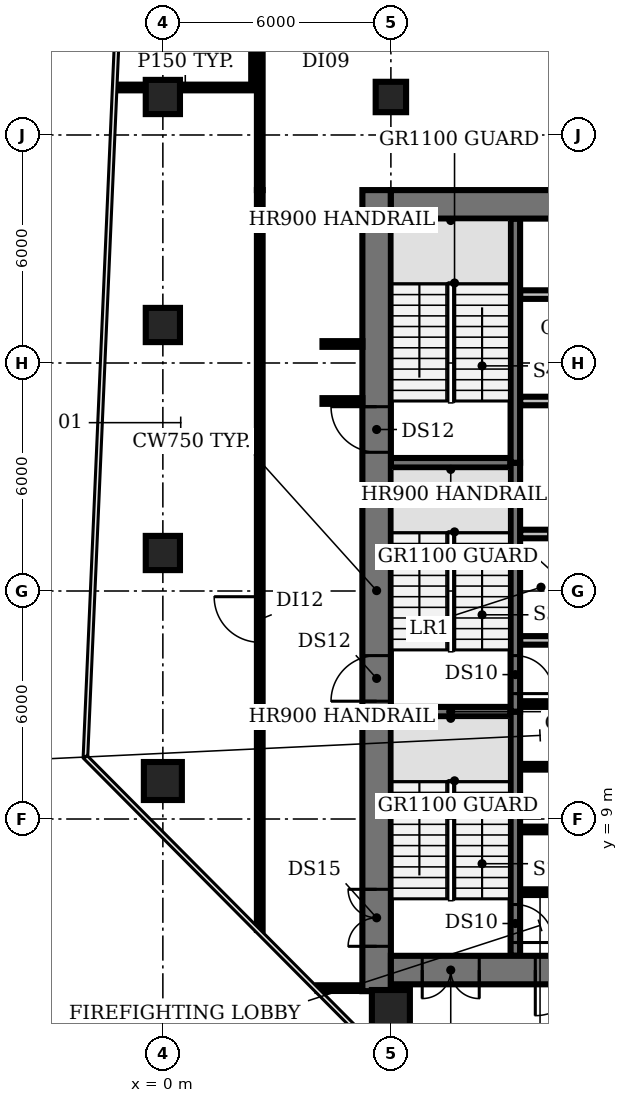
"""IFC4 building model, lengths in metres.
Left out: names, types, materials, properties, quantities, classifications, styles, units other than length and angle.
Written with IfcOpenShell. Run it as: python <this file> out.ifc"""

import sys

from ifc_helpers import new_model, si_unit, direction, frame, frame_2d, origin, origin_2d, place, context, subcontext, project, spatial, rectangle, circle, extrude, element, fill, save


model = new_model("IFC4")
c1 = context("Model", 3, precision=1e-05, world=origin(), true_north=direction((0.0, 1.0)))
c2 = subcontext(c1, "Body", "Model", "MODEL_VIEW")
j1 = project(units=[si_unit("LENGTHUNIT", "METRE"), si_unit("PLANEANGLEUNIT", "RADIAN")], contexts=[c1])
p1 = place(None, origin())
s1 = spatial("IfcSite", under=j1, at=p1, CompositionType="ELEMENT")
p2 = place(p1, origin())
s2 = spatial("IfcBuilding", under=s1, at=p2, CompositionType="ELEMENT")
p3 = place(p2, frame((0.0, 0.0, 121.4)))
s3 = spatial("IfcBuildingStorey", under=s2, at=p3, CompositionType="ELEMENT", Elevation=121.4)
p4 = place(p3, frame((0.0, 10.0, 0.0), z_axis=(0.0, 0.0, 1.0), x_axis=(1.0, 0.0, 0.0)))
e1 = element("IfcColumn", 1, at=p4, inside=s3, PredefinedType="COLUMN", context=c2, shape_type="SweptSolid", body=[
    extrude(circle(Radius=0.5, at=origin_2d()), origin(), (0.0, 0.0, 1.0), 3.85),
])
for number, where, z_axis, x_axis in (
    (2, (0.0, 16.0, 0.0), (0.0, 0.0, 1.0), (1.0, 0.0, 0.0)),
    (3, (0.0, 22.0, 0.0), (0.0, 0.0, 1.0), (1.0, 0.0, 0.0)),
    (4, (0.0, 28.0, 0.0), (0.0, 0.0, 1.0), (1.0, 0.0, 0.0)),
):
    element("IfcColumn", number, at=place(p3, frame(where, z_axis=z_axis, x_axis=x_axis)), inside=s3, PredefinedType="COLUMN", context=c2, shape_type="SweptSolid", body=[
        extrude(rectangle(XDim=0.9, YDim=0.9, at=origin_2d()), origin(), (0.0, 0.0, 1.0), 3.85),
    ])
p5 = place(p3, frame((6.0, 4.0, 0.0), z_axis=(0.0, 0.0, 1.0), x_axis=(1.0, 0.0, 0.0)))
e5 = element("IfcColumn", 5, at=p5, inside=s3, PredefinedType="COLUMN", context=c2, shape_type="SweptSolid", body=[
    extrude(circle(Radius=0.5, at=origin_2d()), origin(), (0.0, 0.0, 1.0), 3.85),
])
p6 = place(p3, frame((6.0, 28.0, 0.0), z_axis=(0.0, 0.0, 1.0), x_axis=(1.0, 0.0, 0.0)))
e6 = element("IfcColumn", 6, at=p6, inside=s3, PredefinedType="COLUMN", context=c2, shape_type="SweptSolid", body=[
    extrude(rectangle(XDim=0.8, YDim=0.8, at=origin_2d()), origin(), (0.0, 0.0, 1.0), 3.85),
])
for number, where, z_axis, x_axis in (
    (7, (9.4, 7.075, 0.0), (0.0, 0.0, 1.0), (1.0, 0.0, 0.0)),
    (8, (9.4, 8.725, 0.0), (0.0, 0.0, 1.0), (1.0, 0.0, 0.0)),
    (9, (9.4, 10.375, 0.0), (0.0, 0.0, 1.0), (1.0, 0.0, 0.0)),
):
    element("IfcWall", number, at=place(p3, frame(where, z_axis=z_axis, x_axis=x_axis)), inside=s3, PredefinedType="SHEAR", context=c2, shape_type="SweptSolid", body=[
        extrude(rectangle(XDim=1.05, YDim=0.15, at=frame_2d((0.525, 0.0))), origin(), (0.0, 0.0, 1.0), 3.85),
    ])
p7 = place(p3, frame((6.0, 11.825, 0.0), z_axis=(0.0, 0.0, 1.0), x_axis=(1.0, 0.0, 0.0)))
e10 = element("IfcWall", 10, at=p7, inside=s3, PredefinedType="SHEAR", context=c2, shape_type="SweptSolid", body=[
    extrude(rectangle(XDim=3.15, YDim=0.25, at=frame_2d((1.575, 0.0))), origin(), (0.0, 0.0, 1.0), 3.85),
])
p8 = place(p3, frame((9.4, 12.025, 0.0), z_axis=(0.0, 0.0, 1.0), x_axis=(1.0, 0.0, 0.0)))
e11 = element("IfcWall", 11, at=p8, inside=s3, PredefinedType="SHEAR", context=c2, shape_type="SweptSolid", body=[
    extrude(rectangle(XDim=1.05, YDim=0.15, at=frame_2d((0.525, 0.0))), origin(), (0.0, 0.0, 1.0), 3.85),
])
p9 = place(p3, frame((9.4, 13.7, 0.0), z_axis=(0.0, 0.0, 1.0), x_axis=(1.0, 0.0, 0.0)))
e12 = element("IfcWall", 12, at=p9, inside=s3, PredefinedType="PARTITIONING", context=c2, shape_type="SweptSolid", body=[
    extrude(rectangle(XDim=4.0, YDim=0.225, at=frame_2d((2.0, 0.0))), origin(), (0.0, 0.0, 1.0), 3.85),
])
p10 = place(p3, frame((9.4, 16.5, 0.0), z_axis=(0.0, 0.0, 1.0), x_axis=(1.0, 0.0, 0.0)))
e13 = element("IfcWall", 13, at=p10, inside=s3, PredefinedType="PARTITIONING", context=c2, shape_type="SweptSolid", body=[
    extrude(rectangle(XDim=14.6, YDim=0.225, at=frame_2d((7.3, 0.0))), origin(), (0.0, 0.0, 1.0), 3.85),
])
p11 = place(p10, frame((0.75, 0.0, 0.0)))
e14 = element("IfcOpeningElement", 14, at=p11, cuts=e13, PredefinedType="OPENING", context=c2, shape_type="SweptSolid", body=[
    extrude(rectangle(XDim=1.1, YDim=2.1, at=frame_2d((0.55, 1.05))), frame((0.0, 0.123, 0.0), z_axis=(0.0, -1.0, 0.0), x_axis=(1.0, 0.0, 0.0)), (0.0, 0.0, 1.0), 0.245),
])
p12 = place(p10, frame((3.55, 0.0, 0.0)))
e15 = element("IfcOpeningElement", 15, at=p12, cuts=e13, PredefinedType="OPENING", context=c2, shape_type="SweptSolid", body=[
    extrude(rectangle(XDim=1.1, YDim=2.1, at=frame_2d((0.55, 1.05))), frame((0.0, 0.123, 0.0), z_axis=(0.0, -1.0, 0.0), x_axis=(1.0, 0.0, 0.0)), (0.0, 0.0, 1.0), 0.245),
])
p13 = place(p10, frame((6.35, 0.0, 0.0)))
e16 = element("IfcOpeningElement", 16, at=p13, cuts=e13, PredefinedType="OPENING", context=c2, shape_type="SweptSolid", body=[
    extrude(rectangle(XDim=1.1, YDim=2.1, at=frame_2d((0.55, 1.05))), frame((0.0, 0.123, 0.0), z_axis=(0.0, -1.0, 0.0), x_axis=(1.0, 0.0, 0.0)), (0.0, 0.0, 1.0), 0.245),
])
p14 = place(p10, frame((9.15, 0.0, 0.0)))
e17 = element("IfcOpeningElement", 17, at=p14, cuts=e13, PredefinedType="OPENING", context=c2, shape_type="SweptSolid", body=[
    extrude(rectangle(XDim=1.1, YDim=2.1, at=frame_2d((0.55, 1.05))), frame((0.0, 0.123, 0.0), z_axis=(0.0, -1.0, 0.0), x_axis=(1.0, 0.0, 0.0)), (0.0, 0.0, 1.0), 0.245),
])
p15 = place(p10, frame((12.4, 0.0, 0.0)))
e18 = element("IfcOpeningElement", 18, at=p15, cuts=e13, PredefinedType="OPENING", context=c2, shape_type="SweptSolid", body=[
    extrude(rectangle(XDim=1.0, YDim=2.1, at=frame_2d((0.5, 1.05))), frame((0.0, 0.123, 0.0), z_axis=(0.0, -1.0, 0.0), x_axis=(1.0, 0.0, 0.0)), (0.0, 0.0, 1.0), 0.245),
])
p16 = place(p3, frame((6.0, 18.375, 0.0), z_axis=(0.0, 0.0, 1.0), x_axis=(1.0, 0.0, 0.0)))
e19 = element("IfcWall", 19, at=p16, inside=s3, PredefinedType="SHEAR", context=c2, shape_type="SweptSolid", body=[
    extrude(rectangle(XDim=3.15, YDim=0.25, at=frame_2d((1.575, 0.0))), origin(), (0.0, 0.0, 1.0), 3.85),
])
p17 = place(p3, frame((24.0, 20.0, 0.0), z_axis=(0.0, 0.0, 1.0), x_axis=(-1.0, 0.0, 0.0)))
e20 = element("IfcWall", 20, at=p17, inside=s3, PredefinedType="PARTITIONING", context=c2, shape_type="SweptSolid", body=[
    extrude(rectangle(XDim=14.6, YDim=0.225, at=frame_2d((7.3, 0.0))), origin(), (0.0, 0.0, 1.0), 3.85),
])
p18 = place(p17, frame((12.2, 0.0, 0.0)))
e21 = element("IfcOpeningElement", 21, at=p18, cuts=e20, PredefinedType="OPENING", context=c2, shape_type="SweptSolid", body=[
    extrude(rectangle(XDim=1.0, YDim=2.1, at=frame_2d((0.5, 1.05))), frame((0.0, 0.123, 0.0), z_axis=(0.0, -1.0, 0.0), x_axis=(1.0, 0.0, 0.0)), (0.0, 0.0, 1.0), 0.245),
])
p19 = place(p17, frame((9.025, 0.0, 0.0)))
e22 = element("IfcOpeningElement", 22, at=p19, cuts=e20, PredefinedType="OPENING", context=c2, shape_type="SweptSolid", body=[
    extrude(rectangle(XDim=0.9, YDim=2.1, at=frame_2d((0.45, 1.05))), frame((0.0, 0.123, 0.0), z_axis=(0.0, -1.0, 0.0), x_axis=(1.0, 0.0, 0.0)), (0.0, 0.0, 1.0), 0.245),
])
p20 = place(p17, frame((5.375, 0.0, 0.0)))
e23 = element("IfcOpeningElement", 23, at=p20, cuts=e20, PredefinedType="OPENING", context=c2, shape_type="SweptSolid", body=[
    extrude(rectangle(XDim=1.0, YDim=2.1, at=frame_2d((0.5, 1.05))), frame((0.0, 0.123, 0.0), z_axis=(0.0, -1.0, 0.0), x_axis=(1.0, 0.0, 0.0)), (0.0, 0.0, 1.0), 0.245),
])
p21 = place(p17, frame((1.2, 0.0, 0.0)))
e24 = element("IfcOpeningElement", 24, at=p21, cuts=e20, PredefinedType="OPENING", context=c2, shape_type="SweptSolid", body=[
    extrude(rectangle(XDim=1.0, YDim=2.1, at=frame_2d((0.5, 1.05))), frame((0.0, 0.123, 0.0), z_axis=(0.0, -1.0, 0.0), x_axis=(1.0, 0.0, 0.0)), (0.0, 0.0, 1.0), 0.245),
])
p22 = place(p3, frame((9.4, 22.8, 0.0), z_axis=(0.0, 0.0, 1.0), x_axis=(1.0, 0.0, 0.0)))
e25 = element("IfcWall", 25, at=p22, inside=s3, PredefinedType="PARTITIONING", context=c2, shape_type="SweptSolid", body=[
    extrude(rectangle(XDim=14.6, YDim=0.225, at=frame_2d((7.3, 0.0))), origin(), (0.0, 0.0, 1.0), 3.85),
])
p23 = place(p3, frame((9.275, 11.825, 0.0), z_axis=(0.0, 0.0, 1.0), x_axis=(0.0, -1.0, 0.0)))
e26 = element("IfcWall", 26, at=p23, inside=s3, PredefinedType="SHEAR", context=c2, shape_type="SweptSolid", body=[
    extrude(rectangle(XDim=6.425, YDim=0.25, at=frame_2d((3.212, 0.0))), origin(), (0.0, 0.0, 1.0), 3.85),
])
p24 = place(p23, frame((5.075, 0.0, 0.0)))
e27 = element("IfcOpeningElement", 27, at=p24, cuts=e26, PredefinedType="OPENING", context=c2, shape_type="SweptSolid", body=[
    extrude(rectangle(XDim=1.0, YDim=2.1, at=frame_2d((0.5, 1.05))), frame((0.0, 0.135, 0.0), z_axis=(0.0, -1.0, 0.0), x_axis=(1.0, 0.0, 0.0)), (0.0, 0.0, 1.0), 0.27),
])
p25 = place(p3, frame((9.275, 18.375, 0.0), z_axis=(0.0, 0.0, 1.0), x_axis=(0.0, -1.0, 0.0)))
e28 = element("IfcWall", 28, at=p25, inside=s3, PredefinedType="SHEAR", context=c2, shape_type="SweptSolid", body=[
    extrude(rectangle(XDim=6.55, YDim=0.25, at=frame_2d((3.275, 0.0))), origin(), (0.0, 0.0, 1.0), 3.85),
])
p26 = place(p25, frame((5.075, 0.0, 0.0)))
e29 = element("IfcOpeningElement", 29, at=p26, cuts=e28, PredefinedType="OPENING", context=c2, shape_type="SweptSolid", body=[
    extrude(rectangle(XDim=1.0, YDim=2.1, at=frame_2d((0.5, 1.05))), frame((0.0, 0.135, 0.0), z_axis=(0.0, -1.0, 0.0), x_axis=(1.0, 0.0, 0.0)), (0.0, 0.0, 1.0), 0.27),
])
p27 = place(p3, frame((9.275, 18.375, 0.0), z_axis=(0.0, 0.0, 1.0), x_axis=(0.0, 1.0, 0.0)))
e30 = element("IfcWall", 30, at=p27, inside=s3, PredefinedType="SHEAR", context=c2, shape_type="SweptSolid", body=[
    extrude(rectangle(XDim=6.425, YDim=0.25, at=frame_2d((3.212, 0.0))), origin(), (0.0, 0.0, 1.0), 3.85),
])
p28 = place(p3, frame((5.625, 4.47, 0.0), z_axis=(0.0, 0.0, 1.0), x_axis=(0.0, 1.0, 0.0)))
e31 = element("IfcWall", 31, at=p28, inside=s3, PredefinedType="SHEAR", context=c2, shape_type="SweptSolid", body=[
    extrude(rectangle(XDim=21.08, YDim=0.75, at=frame_2d((10.54, 0.0))), origin(), (0.0, 0.0, 1.0), 3.85),
])
p29 = place(p28, frame((1.18, 0.0, 0.0)))
e32 = element("IfcOpeningElement", 32, at=p29, cuts=e31, PredefinedType="OPENING", context=c2, shape_type="SweptSolid", body=[
    extrude(rectangle(XDim=1.5, YDim=2.1, at=frame_2d((0.75, 1.05))), frame((0.0, 0.385, 0.0), z_axis=(0.0, -1.0, 0.0), x_axis=(1.0, 0.0, 0.0)), (0.0, 0.0, 1.0), 0.77),
])
p30 = place(p28, frame((7.63, 0.0, 0.0)))
e33 = element("IfcOpeningElement", 33, at=p30, cuts=e31, PredefinedType="OPENING", context=c2, shape_type="SweptSolid", body=[
    extrude(rectangle(XDim=1.2, YDim=2.1, at=frame_2d((0.6, 1.05))), frame((0.0, 0.385, 0.0), z_axis=(0.0, -1.0, 0.0), x_axis=(1.0, 0.0, 0.0)), (0.0, 0.0, 1.0), 0.77),
])
p31 = place(p28, frame((14.18, 0.0, 0.0)))
e34 = element("IfcOpeningElement", 34, at=p31, cuts=e31, PredefinedType="OPENING", context=c2, shape_type="SweptSolid", body=[
    extrude(rectangle(XDim=1.2, YDim=2.1, at=frame_2d((0.6, 1.05))), frame((0.0, 0.385, 0.0), z_axis=(0.0, -1.0, 0.0), x_axis=(1.0, 0.0, 0.0)), (0.0, 0.0, 1.0), 0.77),
])
p32 = place(p3, frame((24.0, 5.025, 0.0), z_axis=(0.0, 0.0, 1.0), x_axis=(-1.0, 0.0, 0.0)))
e35 = element("IfcWall", 35, at=p32, inside=s3, PredefinedType="SHEAR", context=c2, shape_type="SweptSolid", body=[
    extrude(rectangle(XDim=18.0, YDim=0.75, at=frame_2d((9.0, 0.0))), origin(), (0.0, 0.0, 1.0), 3.85),
])
p33 = place(p32, frame((0.825, 0.0, 0.0)))
e36 = element("IfcOpeningElement", 36, at=p33, cuts=e35, PredefinedType="OPENING", context=c2, shape_type="SweptSolid", body=[
    extrude(rectangle(XDim=1.5, YDim=2.1, at=frame_2d((0.75, 1.05))), frame((0.0, 0.385, 0.0), z_axis=(0.0, -1.0, 0.0), x_axis=(1.0, 0.0, 0.0)), (0.0, 0.0, 1.0), 0.77),
])
p34 = place(p32, frame((15.675, 0.0, 0.0)))
e37 = element("IfcOpeningElement", 37, at=p34, cuts=e35, PredefinedType="OPENING", context=c2, shape_type="SweptSolid", body=[
    extrude(rectangle(XDim=1.5, YDim=2.1, at=frame_2d((0.75, 1.05))), frame((0.0, 0.385, 0.0), z_axis=(0.0, -1.0, 0.0), x_axis=(1.0, 0.0, 0.0)), (0.0, 0.0, 1.0), 0.77),
])
p35 = place(p32, frame((13.0, 0.0, 0.0)))
e38 = element("IfcOpeningElement", 38, at=p35, cuts=e35, PredefinedType="OPENING", context=c2, shape_type="SweptSolid", body=[
    extrude(rectangle(XDim=1.2, YDim=2.1, at=frame_2d((0.6, 1.05))), frame((0.0, 0.385, 0.0), z_axis=(0.0, -1.0, 0.0), x_axis=(1.0, 0.0, 0.0)), (0.0, 0.0, 1.0), 0.77),
])
p36 = place(p32, frame((4.35, 0.0, 0.0)))
e39 = element("IfcOpeningElement", 39, at=p36, cuts=e35, PredefinedType="OPENING", context=c2, shape_type="SweptSolid", body=[
    extrude(rectangle(XDim=1.0, YDim=2.1, at=frame_2d((0.5, 1.05))), frame((0.0, 0.385, 0.0), z_axis=(0.0, -1.0, 0.0), x_axis=(1.0, 0.0, 0.0)), (0.0, 0.0, 1.0), 0.77),
])
p37 = place(p3, frame((6.0, 25.175, 0.0), z_axis=(0.0, 0.0, 1.0), x_axis=(1.0, 0.0, 0.0)))
e40 = element("IfcWall", 40, at=p37, inside=s3, PredefinedType="SHEAR", context=c2, shape_type="SweptSolid", body=[
    extrude(rectangle(XDim=18.0, YDim=0.75, at=frame_2d((9.0, 0.0))), origin(), (0.0, 0.0, 1.0), 3.85),
])
p38 = place(p3, frame((-1.22, 28.25, 0.0), z_axis=(0.0, 0.0, 1.0), x_axis=(1.0, 0.0, 0.0)))
e41 = element("IfcWall", 41, at=p38, inside=s3, PredefinedType="PARTITIONING", context=c2, shape_type="SweptSolid", body=[
    extrude(rectangle(XDim=3.62, YDim=0.15, at=frame_2d((1.81, 0.0))), origin(), (0.0, 0.0, 1.0), 2.83),
])
p39 = place(p3, frame((2.4, 28.25, 0.0), z_axis=(0.0, 0.0, 1.0), x_axis=(0.0, 1.0, 0.0)))
e42 = element("IfcWall", 42, at=p39, inside=s3, PredefinedType="PARTITIONING", context=c2, shape_type="SweptSolid", body=[
    extrude(rectangle(XDim=6.0, YDim=0.15, at=frame_2d((3.0, 0.0))), origin(), (0.0, 0.0, 1.0), 2.83),
])
p40 = place(p3, frame((2.55, 6.08, 0.0), z_axis=(0.0, 0.0, 1.0), x_axis=(0.0, 1.0, 0.0)))
e43 = element("IfcWall", 43, at=p40, inside=s3, PredefinedType="PARTITIONING", context=c2, shape_type="SweptSolid", body=[
    extrude(rectangle(XDim=19.47, YDim=0.15, at=frame_2d((9.735, 0.0))), origin(), (0.0, 0.0, 1.0), 2.83),
])
p41 = place(p40, frame((7.57, 0.0, 0.0)))
e44 = element("IfcOpeningElement", 44, at=p41, cuts=e43, PredefinedType="OPENING", context=c2, shape_type="SweptSolid", body=[
    extrude(rectangle(XDim=1.2, YDim=2.1, at=frame_2d((0.6, 1.05))), frame((0.0, 0.085, 0.0), z_axis=(0.0, -1.0, 0.0), x_axis=(1.0, 0.0, 0.0)), (0.0, 0.0, 1.0), 0.17),
])
p42 = place(p3, frame((2.55, 25.55, 0.0), z_axis=(0.0, 0.0, 1.0), x_axis=(0.0, 1.0, 0.0)))
e45 = element("IfcWall", 45, at=p42, inside=s3, PredefinedType="PARTITIONING", context=c2, shape_type="SweptSolid", body=[
    extrude(rectangle(XDim=3.9, YDim=0.15, at=frame_2d((1.95, 0.0))), origin(), (0.0, 0.0, 1.0), 2.83),
])
p43 = place(p3, frame((4.07, 4.55, 0.0), z_axis=(0.0, 0.0, 1.0), x_axis=(1.0, 0.0, 0.0)))
e46 = element("IfcWall", 46, at=p43, inside=s3, PredefinedType="PARTITIONING", context=c2, shape_type="SweptSolid", body=[
    extrude(rectangle(XDim=1.08, YDim=0.15, at=frame_2d((0.54, 0.0))), origin(), (0.0, 0.0, 1.0), 2.83),
])
for number, where, z_axis, x_axis in (
    (47, (4.2, 20.0, 0.0), (0.0, 0.0, 1.0), (1.0, 0.0, 0.0)),
    (48, (4.2, 21.5, 0.0), (0.0, 0.0, 1.0), (1.0, 0.0, 0.0)),
):
    element("IfcWall", number, at=place(p3, frame(where, z_axis=z_axis, x_axis=x_axis)), inside=s3, PredefinedType="PARTITIONING", context=c2, shape_type="SweptSolid", body=[
        extrude(rectangle(XDim=1.05, YDim=0.15, at=frame_2d((0.525, 0.0))), origin(), (0.0, 0.0, 1.0), 2.83),
    ])
p44 = place(p24, origin())
e49 = element("IfcDoor", 49, at=p44, inside=s3, OperationType="SINGLE_SWING_RIGHT", PredefinedType="DOOR", context=c2, shape_type="SweptSolid", body=[
    extrude(rectangle(XDim=1.0, YDim=2.1, at=frame_2d((0.5, 1.05))), frame((0.0, 0.025, 0.0), z_axis=(0.0, -1.0, 0.0), x_axis=(1.0, 0.0, 0.0)), (0.0, 0.0, 1.0), 0.05),
])
fill(e27, e49)
p45 = place(p26, origin())
e50 = element("IfcDoor", 50, at=p45, inside=s3, OperationType="SINGLE_SWING_RIGHT", PredefinedType="DOOR", context=c2, shape_type="SweptSolid", body=[
    extrude(rectangle(XDim=1.0, YDim=2.1, at=frame_2d((0.5, 1.05))), frame((0.0, 0.025, 0.0), z_axis=(0.0, -1.0, 0.0), x_axis=(1.0, 0.0, 0.0)), (0.0, 0.0, 1.0), 0.05),
])
fill(e29, e50)
p46 = place(p29, origin())
e51 = element("IfcDoor", 51, at=p46, inside=s3, OperationType="DOUBLE_DOOR_SINGLE_SWING", PredefinedType="DOOR", context=c2, shape_type="SweptSolid", body=[
    extrude(rectangle(XDim=1.5, YDim=2.1, at=frame_2d((0.75, 1.05))), frame((0.0, 0.025, 0.0), z_axis=(0.0, -1.0, 0.0), x_axis=(1.0, 0.0, 0.0)), (0.0, 0.0, 1.0), 0.05),
])
fill(e32, e51)
p47 = place(p30, origin())
e52 = element("IfcDoor", 52, at=p47, inside=s3, OperationType="SINGLE_SWING_LEFT", PredefinedType="DOOR", context=c2, shape_type="SweptSolid", body=[
    extrude(rectangle(XDim=1.2, YDim=2.1, at=frame_2d((0.6, 1.05))), frame((0.0, 0.025, 0.0), z_axis=(0.0, -1.0, 0.0), x_axis=(1.0, 0.0, 0.0)), (0.0, 0.0, 1.0), 0.05),
])
fill(e33, e52)
p48 = place(p31, origin())
e53 = element("IfcDoor", 53, at=p48, inside=s3, OperationType="SINGLE_SWING_RIGHT", PredefinedType="DOOR", context=c2, shape_type="SweptSolid", body=[
    extrude(rectangle(XDim=1.2, YDim=2.1, at=frame_2d((0.6, 1.05))), frame((0.0, 0.025, 0.0), z_axis=(0.0, -1.0, 0.0), x_axis=(1.0, 0.0, 0.0)), (0.0, 0.0, 1.0), 0.05),
])
fill(e34, e53)
p49 = place(p34, origin())
e54 = element("IfcDoor", 54, at=p49, inside=s3, OperationType="DOUBLE_DOOR_SINGLE_SWING", PredefinedType="DOOR", context=c2, shape_type="SweptSolid", body=[
    extrude(rectangle(XDim=1.5, YDim=2.1, at=frame_2d((0.75, 1.05))), frame((0.0, 0.025, 0.0), z_axis=(0.0, -1.0, 0.0), x_axis=(1.0, 0.0, 0.0)), (0.0, 0.0, 1.0), 0.05),
])
fill(e37, e54)
p50 = place(p35, origin())
e55 = element("IfcDoor", 55, at=p50, inside=s3, OperationType="SINGLE_SWING_RIGHT", PredefinedType="DOOR", context=c2, shape_type="SweptSolid", body=[
    extrude(rectangle(XDim=1.2, YDim=2.1, at=frame_2d((0.6, 1.05))), frame((0.0, 0.025, 0.0), z_axis=(0.0, -1.0, 0.0), x_axis=(1.0, 0.0, 0.0)), (0.0, 0.0, 1.0), 0.05),
])
fill(e38, e55)
p51 = place(p41, origin())
e56 = element("IfcDoor", 56, at=p51, inside=s3, OperationType="SINGLE_SWING_RIGHT", PredefinedType="DOOR", context=c2, shape_type="SweptSolid", body=[
    extrude(rectangle(XDim=1.2, YDim=2.1, at=frame_2d((0.6, 1.05))), frame((0.0, 0.025, 0.0), z_axis=(0.0, -1.0, 0.0), x_axis=(1.0, 0.0, 0.0)), (0.0, 0.0, 1.0), 0.05),
])
fill(e44, e56)
save(model, sys.argv[1])
